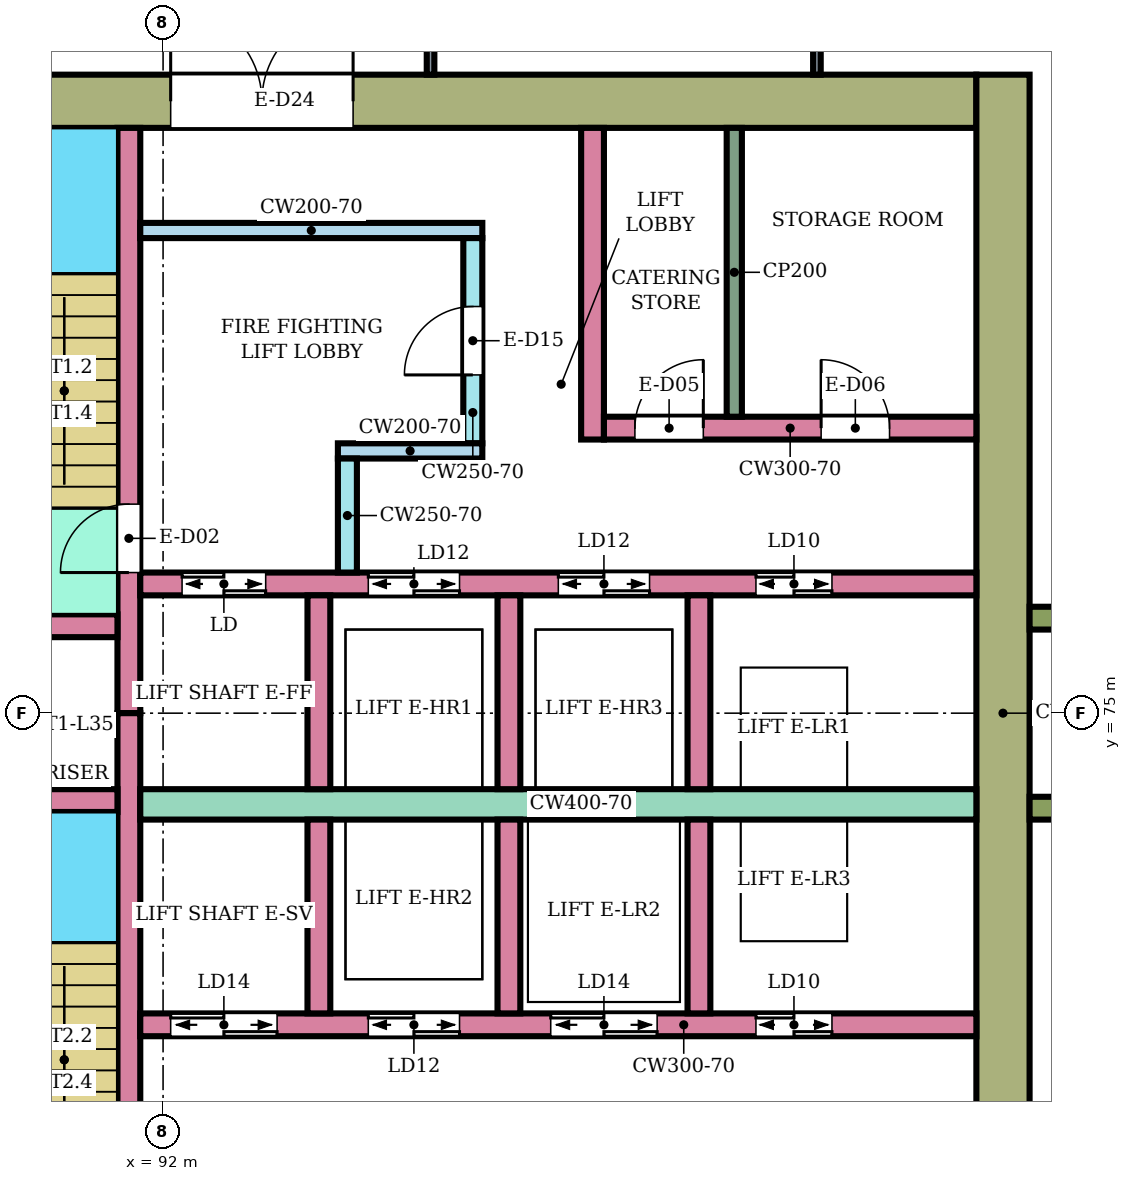
"""IFC4 building model, lengths in metres.
Left out: names, types, materials, properties, quantities, classifications, styles, units other than length and angle.
Written with IfcOpenShell. Run it as: python <this file> out.ifc"""

import sys

from ifc_helpers import new_model, si_unit, direction, frame, frame_2d, origin, place, context, subcontext, project, spatial, rectangle, extrude, element, fill, save


model = new_model("IFC4")
c1 = context("Model", 3, precision=1e-05, world=origin(), true_north=direction((0.0, 1.0)))
c2 = subcontext(c1, "Body", "Model", "MODEL_VIEW")
j1 = project(units=[si_unit("LENGTHUNIT", "METRE"), si_unit("PLANEANGLEUNIT", "RADIAN")], contexts=[c1])
p1 = place(None, origin())
s1 = spatial("IfcSite", under=j1, at=p1, CompositionType="ELEMENT")
p2 = place(p1, origin())
s2 = spatial("IfcBuilding", under=s1, at=p2, CompositionType="ELEMENT")
p3 = place(p2, frame((0.0, 0.0, 149.7)))
s3 = spatial("IfcBuildingStorey", under=s2, at=p3, CompositionType="ELEMENT", Elevation=149.7)
p4 = place(p3, frame((87.9, 83.05, 0.0), z_axis=(0.0, 0.0, 1.0), x_axis=(1.0, 0.0, 0.0)))
e1 = element("IfcWall", 1, at=p4, inside=s3, PredefinedType="SHEAR", context=c2, shape_type="SweptSolid", body=[
    extrude(rectangle(XDim=14.8, YDim=0.7, at=frame_2d((7.4, 0.0))), origin(), (0.0, 0.0, 1.0), 7.68),
])
p5 = place(p4, frame((4.2, 0.0, 0.0)))
e2 = element("IfcOpeningElement", 2, at=p5, cuts=e1, PredefinedType="OPENING", context=c2, shape_type="SweptSolid", body=[
    extrude(rectangle(XDim=2.4, YDim=2.4, at=frame_2d((1.2, 1.2))), frame((0.0, 0.36, 0.0), z_axis=(0.0, -1.0, 0.0), x_axis=(1.0, 0.0, 0.0)), (0.0, 0.0, 1.0), 0.72),
])
p6 = place(p3, frame((103.05, 66.6, 0.0), z_axis=(0.0, 0.0, 1.0), x_axis=(0.0, 1.0, 0.0)))
e3 = element("IfcWall", 3, at=p6, inside=s3, PredefinedType="SHEAR", context=c2, shape_type="SweptSolid", body=[
    extrude(rectangle(XDim=16.8, YDim=0.7, at=frame_2d((8.4, 0.0))), origin(), (0.0, 0.0, 1.0), 7.68),
])
p7 = place(p3, frame((91.55, 75.0, 0.0), z_axis=(0.0, 0.0, 1.0), x_axis=(0.0, 1.0, 0.0)))
e4 = element("IfcWall", 4, at=p7, inside=s3, PredefinedType="SHEAR", context=c2, shape_type="SweptSolid", body=[
    extrude(rectangle(XDim=7.7, YDim=0.3, at=frame_2d((3.85, 0.0))), origin(), (0.0, 0.0, 1.0), 7.68),
])
p8 = place(p7, frame((1.85, 0.0, 0.0)))
e5 = element("IfcOpeningElement", 5, at=p8, cuts=e4, PredefinedType="OPENING", context=c2, shape_type="SweptSolid", body=[
    extrude(rectangle(XDim=0.9, YDim=2.1, at=frame_2d((0.45, 1.05))), frame((0.0, 0.16, 0.0), z_axis=(0.0, -1.0, 0.0), x_axis=(1.0, 0.0, 0.0)), (0.0, 0.0, 1.0), 0.32),
])
p9 = place(p3, frame((91.55, 67.3, 0.0), z_axis=(0.0, 0.0, 1.0), x_axis=(0.0, 1.0, 0.0)))
e6 = element("IfcWall", 6, at=p9, inside=s3, PredefinedType="SHEAR", context=c2, shape_type="SweptSolid", body=[
    extrude(rectangle(XDim=7.7, YDim=0.3, at=frame_2d((3.85, 0.0))), origin(), (0.0, 0.0, 1.0), 7.68),
])
p10 = place(p9, frame((0.35, 0.0, 0.0)))
e7 = element("IfcOpeningElement", 7, at=p10, cuts=e6, PredefinedType="OPENING", context=c2, shape_type="SweptSolid", body=[
    extrude(rectangle(XDim=0.9, YDim=2.1, at=frame_2d((0.45, 1.05))), frame((0.0, 0.16, 0.0), z_axis=(0.0, -1.0, 0.0), x_axis=(1.0, 0.0, 0.0)), (0.0, 0.0, 1.0), 0.32),
])
p11 = place(p3, frame((88.35, 76.15, 0.0), z_axis=(0.0, 0.0, 1.0), x_axis=(1.0, 0.0, 0.0)))
e8 = element("IfcWall", 8, at=p11, inside=s3, PredefinedType="SHEAR", context=c2, shape_type="SweptSolid", body=[
    extrude(rectangle(XDim=3.05, YDim=0.3, at=frame_2d((1.525, 0.0))), origin(), (0.0, 0.0, 1.0), 7.68),
])
p12 = place(p11, frame((1.1, 0.0, 0.0)))
e9 = element("IfcOpeningElement", 9, at=p12, cuts=e8, PredefinedType="OPENING", context=c2, shape_type="SweptSolid", body=[
    extrude(rectangle(XDim=0.7, YDim=2.0, at=frame_2d((0.35, 1.0))), frame((0.0, 0.16, 0.0), z_axis=(0.0, -1.0, 0.0), x_axis=(1.0, 0.0, 0.0)), (0.0, 0.0, 1.0), 0.32),
])
p13 = place(p3, frame((88.35, 73.85, 0.0), z_axis=(0.0, 0.0, 1.0), x_axis=(1.0, 0.0, 0.0)))
e10 = element("IfcWall", 10, at=p13, inside=s3, PredefinedType="SHEAR", context=c2, shape_type="SweptSolid", body=[
    extrude(rectangle(XDim=3.05, YDim=0.3, at=frame_2d((1.525, 0.0))), origin(), (0.0, 0.0, 1.0), 7.68),
])
p14 = place(p3, frame((91.7, 76.7, 0.0), z_axis=(0.0, 0.0, 1.0), x_axis=(1.0, 0.0, 0.0)))
e11 = element("IfcWall", 11, at=p14, inside=s3, PredefinedType="SHEAR", context=c2, shape_type="SweptSolid", body=[
    extrude(rectangle(XDim=11.0, YDim=0.3, at=frame_2d((5.5, 0.0))), origin(), (0.0, 0.0, 1.0), 7.68),
])
p15 = place(p14, frame((0.55, 0.0, 0.0)))
e12 = element("IfcOpeningElement", 12, at=p15, cuts=e11, PredefinedType="OPENING", context=c2, shape_type="SweptSolid", body=[
    extrude(rectangle(XDim=1.1, YDim=2.1, at=frame_2d((0.55, 1.05))), frame((0.0, 0.16, 0.0), z_axis=(0.0, -1.0, 0.0), x_axis=(1.0, 0.0, 0.0)), (0.0, 0.0, 1.0), 0.32),
])
p16 = place(p14, frame((3.0, 0.0, 0.0)))
e13 = element("IfcOpeningElement", 13, at=p16, cuts=e11, PredefinedType="OPENING", context=c2, shape_type="SweptSolid", body=[
    extrude(rectangle(XDim=1.2, YDim=2.1, at=frame_2d((0.6, 1.05))), frame((0.0, 0.16, 0.0), z_axis=(0.0, -1.0, 0.0), x_axis=(1.0, 0.0, 0.0)), (0.0, 0.0, 1.0), 0.32),
])
p17 = place(p14, frame((5.5, 0.0, 0.0)))
e14 = element("IfcOpeningElement", 14, at=p17, cuts=e11, PredefinedType="OPENING", context=c2, shape_type="SweptSolid", body=[
    extrude(rectangle(XDim=1.2, YDim=2.1, at=frame_2d((0.6, 1.05))), frame((0.0, 0.16, 0.0), z_axis=(0.0, -1.0, 0.0), x_axis=(1.0, 0.0, 0.0)), (0.0, 0.0, 1.0), 0.32),
])
p18 = place(p14, frame((8.1, 0.0, 0.0)))
e15 = element("IfcOpeningElement", 15, at=p18, cuts=e11, PredefinedType="OPENING", context=c2, shape_type="SweptSolid", body=[
    extrude(rectangle(XDim=1.0, YDim=2.1, at=frame_2d((0.5, 1.05))), frame((0.0, 0.16, 0.0), z_axis=(0.0, -1.0, 0.0), x_axis=(1.0, 0.0, 0.0)), (0.0, 0.0, 1.0), 0.32),
])
p19 = place(p3, frame((91.7, 73.8, 0.0), z_axis=(0.0, 0.0, 1.0), x_axis=(1.0, 0.0, 0.0)))
e16 = element("IfcWall", 16, at=p19, inside=s3, PredefinedType="SHEAR", context=c2, shape_type="SweptSolid", body=[
    extrude(rectangle(XDim=11.0, YDim=0.4, at=frame_2d((5.5, 0.0))), origin(), (0.0, 0.0, 1.0), 7.68),
])
p20 = place(p3, frame((91.7, 70.9, 0.0), z_axis=(0.0, 0.0, 1.0), x_axis=(1.0, 0.0, 0.0)))
e17 = element("IfcWall", 17, at=p20, inside=s3, PredefinedType="SHEAR", context=c2, shape_type="SweptSolid", body=[
    extrude(rectangle(XDim=11.0, YDim=0.3, at=frame_2d((5.5, 0.0))), origin(), (0.0, 0.0, 1.0), 7.68),
])
p21 = place(p20, frame((0.4, 0.0, 0.0)))
e18 = element("IfcOpeningElement", 18, at=p21, cuts=e17, PredefinedType="OPENING", context=c2, shape_type="SweptSolid", body=[
    extrude(rectangle(XDim=1.4, YDim=2.1, at=frame_2d((0.7, 1.05))), frame((0.0, 0.16, 0.0), z_axis=(0.0, -1.0, 0.0), x_axis=(1.0, 0.0, 0.0)), (0.0, 0.0, 1.0), 0.32),
])
p22 = place(p20, frame((3.0, 0.0, 0.0)))
e19 = element("IfcOpeningElement", 19, at=p22, cuts=e17, PredefinedType="OPENING", context=c2, shape_type="SweptSolid", body=[
    extrude(rectangle(XDim=1.2, YDim=2.1, at=frame_2d((0.6, 1.05))), frame((0.0, 0.16, 0.0), z_axis=(0.0, -1.0, 0.0), x_axis=(1.0, 0.0, 0.0)), (0.0, 0.0, 1.0), 0.32),
])
p23 = place(p20, frame((5.4, 0.0, 0.0)))
e20 = element("IfcOpeningElement", 20, at=p23, cuts=e17, PredefinedType="OPENING", context=c2, shape_type="SweptSolid", body=[
    extrude(rectangle(XDim=1.4, YDim=2.1, at=frame_2d((0.7, 1.05))), frame((0.0, 0.16, 0.0), z_axis=(0.0, -1.0, 0.0), x_axis=(1.0, 0.0, 0.0)), (0.0, 0.0, 1.0), 0.32),
])
p24 = place(p20, frame((8.1, 0.0, 0.0)))
e21 = element("IfcOpeningElement", 21, at=p24, cuts=e17, PredefinedType="OPENING", context=c2, shape_type="SweptSolid", body=[
    extrude(rectangle(XDim=1.0, YDim=2.1, at=frame_2d((0.5, 1.05))), frame((0.0, 0.16, 0.0), z_axis=(0.0, -1.0, 0.0), x_axis=(1.0, 0.0, 0.0)), (0.0, 0.0, 1.0), 0.32),
])
for number, where, z_axis, x_axis in (
    (22, (94.05, 74.0, 0.0), (0.0, 0.0, 1.0), (0.0, 1.0, 0.0)),
    (23, (96.55, 74.0, 0.0), (0.0, 0.0, 1.0), (0.0, 1.0, 0.0)),
    (24, (99.05, 74.0, 0.0), (0.0, 0.0, 1.0), (0.0, 1.0, 0.0)),
    (25, (94.05, 71.05, 0.0), (0.0, 0.0, 1.0), (0.0, 1.0, 0.0)),
    (26, (96.55, 71.05, 0.0), (0.0, 0.0, 1.0), (0.0, 1.0, 0.0)),
    (27, (99.05, 71.05, 0.0), (0.0, 0.0, 1.0), (0.0, 1.0, 0.0)),
):
    element("IfcWall", number, at=place(p3, frame(where, z_axis=z_axis, x_axis=x_axis)), inside=s3, PredefinedType="SHEAR", context=c2, shape_type="SweptSolid", body=[
        extrude(rectangle(XDim=2.55, YDim=0.3, at=frame_2d((1.275, 0.0))), origin(), (0.0, 0.0, 1.0), 7.68),
    ])
p25 = place(p3, frame((91.7, 81.35, 0.0), z_axis=(0.0, 0.0, 1.0), x_axis=(1.0, 0.0, 0.0)))
e28 = element("IfcWall", 28, at=p25, inside=s3, PredefinedType="SHEAR", context=c2, shape_type="SweptSolid", body=[
    extrude(rectangle(XDim=4.5, YDim=0.2, at=frame_2d((2.25, 0.0))), origin(), (0.0, 0.0, 1.0), 7.68),
])
p26 = place(p3, frame((96.075, 78.55, 0.0), z_axis=(0.0, 0.0, 1.0), x_axis=(0.0, 1.0, 0.0)))
e29 = element("IfcWall", 29, at=p26, inside=s3, PredefinedType="SHEAR", context=c2, shape_type="SweptSolid", body=[
    extrude(rectangle(XDim=2.7, YDim=0.25, at=frame_2d((1.35, 0.0))), origin(), (0.0, 0.0, 1.0), 7.68),
])
p27 = place(p26, frame((0.9, 0.0, 0.0)))
e30 = element("IfcOpeningElement", 30, at=p27, cuts=e29, PredefinedType="OPENING", context=c2, shape_type="SweptSolid", body=[
    extrude(rectangle(XDim=0.9, YDim=2.1, at=frame_2d((0.45, 1.05))), frame((0.0, 0.135, 0.0), z_axis=(0.0, -1.0, 0.0), x_axis=(1.0, 0.0, 0.0)), (0.0, 0.0, 1.0), 0.27),
])
p28 = place(p3, frame((94.3, 78.45, 0.0), z_axis=(0.0, 0.0, 1.0), x_axis=(1.0, 0.0, 0.0)))
e31 = element("IfcWall", 31, at=p28, inside=s3, PredefinedType="SHEAR", context=c2, shape_type="SweptSolid", body=[
    extrude(rectangle(XDim=1.9, YDim=0.2, at=frame_2d((0.95, 0.0))), origin(), (0.0, 0.0, 1.0), 7.68),
])
p29 = place(p3, frame((94.425, 76.85, 0.0), z_axis=(0.0, 0.0, 1.0), x_axis=(0.0, 1.0, 0.0)))
e32 = element("IfcWall", 32, at=p29, inside=s3, PredefinedType="SHEAR", context=c2, shape_type="SweptSolid", body=[
    extrude(rectangle(XDim=1.5, YDim=0.25, at=frame_2d((0.75, 0.0))), origin(), (0.0, 0.0, 1.0), 7.68),
])
p30 = place(p3, frame((97.65, 78.6, 0.0), z_axis=(0.0, 0.0, 1.0), x_axis=(0.0, 1.0, 0.0)))
e33 = element("IfcWall", 33, at=p30, inside=s3, PredefinedType="SHEAR", context=c2, shape_type="SweptSolid", body=[
    extrude(rectangle(XDim=4.1, YDim=0.3, at=frame_2d((2.05, 0.0))), origin(), (0.0, 0.0, 1.0), 7.68),
])
p31 = place(p3, frame((97.8, 78.75, 0.0), z_axis=(0.0, 0.0, 1.0), x_axis=(1.0, 0.0, 0.0)))
e34 = element("IfcWall", 34, at=p31, inside=s3, PredefinedType="SHEAR", context=c2, shape_type="SweptSolid", body=[
    extrude(rectangle(XDim=4.9, YDim=0.3, at=frame_2d((2.45, 0.0))), origin(), (0.0, 0.0, 1.0), 7.68),
])
p32 = place(p31, frame((0.407, 0.0, 0.0)))
e35 = element("IfcOpeningElement", 35, at=p32, cuts=e34, PredefinedType="OPENING", context=c2, shape_type="SweptSolid", body=[
    extrude(rectangle(XDim=0.9, YDim=2.1, at=frame_2d((0.45, 1.05))), frame((0.0, 0.16, 0.0), z_axis=(0.0, -1.0, 0.0), x_axis=(1.0, 0.0, 0.0)), (0.0, 0.0, 1.0), 0.32),
])
p33 = place(p31, frame((2.857, 0.0, 0.0)))
e36 = element("IfcOpeningElement", 36, at=p33, cuts=e34, PredefinedType="OPENING", context=c2, shape_type="SweptSolid", body=[
    extrude(rectangle(XDim=0.9, YDim=2.1, at=frame_2d((0.45, 1.05))), frame((0.0, 0.16, 0.0), z_axis=(0.0, -1.0, 0.0), x_axis=(1.0, 0.0, 0.0)), (0.0, 0.0, 1.0), 0.32),
])
for number, where, z_axis, x_axis in (
    (37, (103.4, 73.75, 0.0), (0.0, 0.0, 1.0), (1.0, 0.0, 0.0)),
    (38, (103.4, 76.25, 0.0), (0.0, 0.0, 1.0), (1.0, 0.0, 0.0)),
):
    element("IfcWall", number, at=place(p3, frame(where, z_axis=z_axis, x_axis=x_axis)), inside=s3, PredefinedType="NOTDEFINED", context=c2, shape_type="SweptSolid", body=[
        extrude(rectangle(XDim=2.416, YDim=0.3, at=frame_2d((1.208, 0.0))), origin(), (0.0, 0.0, 1.0), 8.0),
    ])
p34 = place(p3, frame((95.519, 83.4, 0.0), z_axis=(0.0, 0.0, 1.0), x_axis=(0.0, 1.0, 0.0)))
e39 = element("IfcWall", 39, at=p34, inside=s3, PredefinedType="PARTITIONING", context=c2, shape_type="SweptSolid", body=[
    extrude(rectangle(XDim=8.891, YDim=0.1, at=frame_2d((4.446, 0.0))), origin(), (0.0, 0.0, 1.0), 7.55),
])
p35 = place(p34, frame((3.996, 0.0, 0.0)))
e40 = element("IfcOpeningElement", 40, at=p35, cuts=e39, PredefinedType="OPENING", context=c2, shape_type="SweptSolid", body=[
    extrude(rectangle(XDim=0.9, YDim=2.1, at=frame_2d((0.45, 1.05))), frame((0.0, 0.06, 0.0), z_axis=(0.0, -1.0, 0.0), x_axis=(1.0, 0.0, 0.0)), (0.0, 0.0, 1.0), 0.12),
])
p36 = place(p3, frame((100.602, 83.4, 0.0), z_axis=(0.0, 0.0, 1.0), x_axis=(0.0, 1.0, 0.0)))
e41 = element("IfcWall", 41, at=p36, inside=s3, PredefinedType="PARTITIONING", context=c2, shape_type="SweptSolid", body=[
    extrude(rectangle(XDim=6.768, YDim=0.1, at=frame_2d((3.384, 0.0))), origin(), (0.0, 0.0, 1.0), 7.55),
])
p37 = place(p36, frame((2.334, 0.0, 0.0)))
e42 = element("IfcOpeningElement", 42, at=p37, cuts=e41, PredefinedType="OPENING", context=c2, shape_type="SweptSolid", body=[
    extrude(rectangle(XDim=0.9, YDim=2.1, at=frame_2d((0.45, 1.05))), frame((0.0, 0.06, 0.0), z_axis=(0.0, -1.0, 0.0), x_axis=(1.0, 0.0, 0.0)), (0.0, 0.0, 1.0), 0.12),
])
p38 = place(p3, frame((99.515, 78.9, 0.0), z_axis=(0.0, 0.0, 1.0), x_axis=(0.0, 1.0, 0.0)))
e43 = element("IfcWall", 43, at=p38, inside=s3, PredefinedType="PARTITIONING", context=c2, shape_type="SweptSolid", body=[
    extrude(rectangle(XDim=3.8, YDim=0.2, at=frame_2d((1.9, 0.0))), origin(), (0.0, 0.0, 1.0), 7.68),
])
p39 = place(p8, origin())
e44 = element("IfcDoor", 44, at=p39, inside=s3, OperationType="SINGLE_SWING_LEFT", PredefinedType="DOOR", context=c2, shape_type="SweptSolid", body=[
    extrude(rectangle(XDim=0.9, YDim=2.1, at=frame_2d((0.45, 1.05))), frame((0.0, 0.025, 0.0), z_axis=(0.0, -1.0, 0.0), x_axis=(1.0, 0.0, 0.0)), (0.0, 0.0, 1.0), 0.05),
])
fill(e5, e44)
p40 = place(p15, origin())
e45 = element("IfcDoor", 45, at=p40, inside=s3, OperationType="DOUBLE_DOOR_SLIDING", PredefinedType="DOOR", context=c2, shape_type="SweptSolid", body=[
    extrude(rectangle(XDim=1.1, YDim=2.1, at=frame_2d((0.55, 1.05))), frame((0.0, 0.025, 0.0), z_axis=(0.0, -1.0, 0.0), x_axis=(1.0, 0.0, 0.0)), (0.0, 0.0, 1.0), 0.05),
])
fill(e12, e45)
p41 = place(p16, origin())
e46 = element("IfcDoor", 46, at=p41, inside=s3, OperationType="DOUBLE_DOOR_SLIDING", PredefinedType="DOOR", context=c2, shape_type="SweptSolid", body=[
    extrude(rectangle(XDim=1.2, YDim=2.1, at=frame_2d((0.6, 1.05))), frame((0.0, 0.025, 0.0), z_axis=(0.0, -1.0, 0.0), x_axis=(1.0, 0.0, 0.0)), (0.0, 0.0, 1.0), 0.05),
])
fill(e13, e46)
p42 = place(p17, origin())
e47 = element("IfcDoor", 47, at=p42, inside=s3, OperationType="DOUBLE_DOOR_SLIDING", PredefinedType="DOOR", context=c2, shape_type="SweptSolid", body=[
    extrude(rectangle(XDim=1.2, YDim=2.1, at=frame_2d((0.6, 1.05))), frame((0.0, 0.025, 0.0), z_axis=(0.0, -1.0, 0.0), x_axis=(1.0, 0.0, 0.0)), (0.0, 0.0, 1.0), 0.05),
])
fill(e14, e47)
p43 = place(p18, origin())
e48 = element("IfcDoor", 48, at=p43, inside=s3, OperationType="DOUBLE_DOOR_SLIDING", PredefinedType="DOOR", context=c2, shape_type="SweptSolid", body=[
    extrude(rectangle(XDim=1.0, YDim=2.1, at=frame_2d((0.5, 1.05))), frame((0.0, 0.025, 0.0), z_axis=(0.0, -1.0, 0.0), x_axis=(1.0, 0.0, 0.0)), (0.0, 0.0, 1.0), 0.05),
])
fill(e15, e48)
p44 = place(p21, origin())
e49 = element("IfcDoor", 49, at=p44, inside=s3, OperationType="DOUBLE_DOOR_SLIDING", PredefinedType="DOOR", context=c2, shape_type="SweptSolid", body=[
    extrude(rectangle(XDim=1.4, YDim=2.1, at=frame_2d((0.7, 1.05))), frame((0.0, 0.025, 0.0), z_axis=(0.0, -1.0, 0.0), x_axis=(1.0, 0.0, 0.0)), (0.0, 0.0, 1.0), 0.05),
])
fill(e18, e49)
p45 = place(p22, origin())
e50 = element("IfcDoor", 50, at=p45, inside=s3, OperationType="DOUBLE_DOOR_SLIDING", PredefinedType="DOOR", context=c2, shape_type="SweptSolid", body=[
    extrude(rectangle(XDim=1.2, YDim=2.1, at=frame_2d((0.6, 1.05))), frame((0.0, 0.025, 0.0), z_axis=(0.0, -1.0, 0.0), x_axis=(1.0, 0.0, 0.0)), (0.0, 0.0, 1.0), 0.05),
])
fill(e19, e50)
p46 = place(p23, origin())
e51 = element("IfcDoor", 51, at=p46, inside=s3, OperationType="DOUBLE_DOOR_SLIDING", PredefinedType="DOOR", context=c2, shape_type="SweptSolid", body=[
    extrude(rectangle(XDim=1.4, YDim=2.1, at=frame_2d((0.7, 1.05))), frame((0.0, 0.025, 0.0), z_axis=(0.0, -1.0, 0.0), x_axis=(1.0, 0.0, 0.0)), (0.0, 0.0, 1.0), 0.05),
])
fill(e20, e51)
p47 = place(p24, origin())
e52 = element("IfcDoor", 52, at=p47, inside=s3, OperationType="DOUBLE_DOOR_SLIDING", PredefinedType="DOOR", context=c2, shape_type="SweptSolid", body=[
    extrude(rectangle(XDim=1.0, YDim=2.1, at=frame_2d((0.5, 1.05))), frame((0.0, 0.025, 0.0), z_axis=(0.0, -1.0, 0.0), x_axis=(1.0, 0.0, 0.0)), (0.0, 0.0, 1.0), 0.05),
])
fill(e21, e52)
p48 = place(p27, origin())
e53 = element("IfcDoor", 53, at=p48, inside=s3, OperationType="SINGLE_SWING_LEFT", PredefinedType="DOOR", context=c2, shape_type="SweptSolid", body=[
    extrude(rectangle(XDim=0.9, YDim=2.1, at=frame_2d((0.45, 1.05))), frame((0.0, 0.025, 0.0), z_axis=(0.0, -1.0, 0.0), x_axis=(1.0, 0.0, 0.0)), (0.0, 0.0, 1.0), 0.05),
])
fill(e30, e53)
p49 = place(p32, origin())
e54 = element("IfcDoor", 54, at=p49, inside=s3, OperationType="SINGLE_SWING_RIGHT", PredefinedType="DOOR", context=c2, shape_type="SweptSolid", body=[
    extrude(rectangle(XDim=0.9, YDim=2.1, at=frame_2d((0.45, 1.05))), frame((0.0, 0.025, 0.0), z_axis=(0.0, -1.0, 0.0), x_axis=(1.0, 0.0, 0.0)), (0.0, 0.0, 1.0), 0.05),
])
fill(e35, e54)
p50 = place(p33, origin())
e55 = element("IfcDoor", 55, at=p50, inside=s3, OperationType="SINGLE_SWING_LEFT", PredefinedType="DOOR", context=c2, shape_type="SweptSolid", body=[
    extrude(rectangle(XDim=0.9, YDim=2.1, at=frame_2d((0.45, 1.05))), frame((0.0, 0.025, 0.0), z_axis=(0.0, -1.0, 0.0), x_axis=(1.0, 0.0, 0.0)), (0.0, 0.0, 1.0), 0.05),
])
fill(e36, e55)
p51 = place(p5, origin())
e56 = element("IfcDoor", 56, at=p51, inside=s3, OperationType="DOUBLE_DOOR_SINGLE_SWING", PredefinedType="DOOR", context=c2, shape_type="SweptSolid", body=[
    extrude(rectangle(XDim=2.4, YDim=2.4, at=frame_2d((1.2, 1.2))), frame((0.0, 0.025, 0.0), z_axis=(0.0, -1.0, 0.0), x_axis=(1.0, 0.0, 0.0)), (0.0, 0.0, 1.0), 0.05),
])
fill(e2, e56)
save(model, sys.argv[1])
